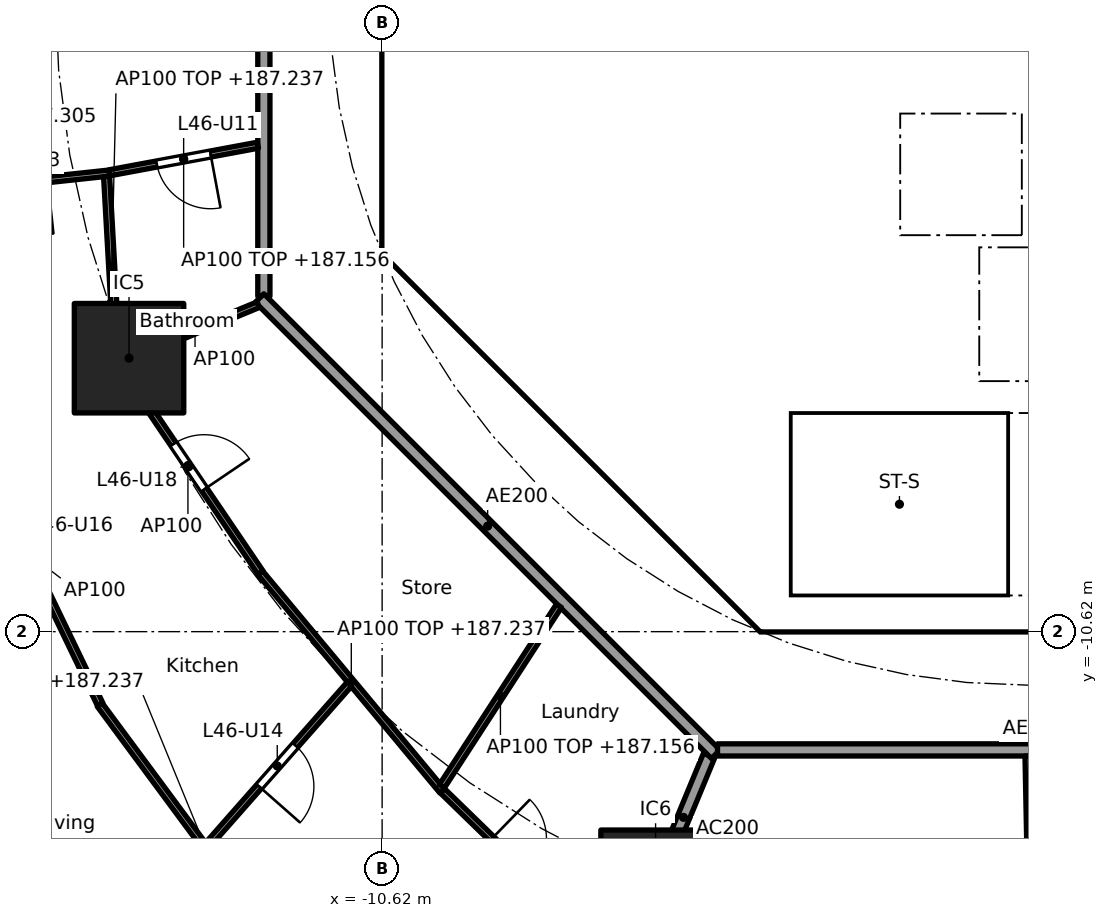
"""IFC4 building model, lengths in metres.
Left out: names, types, materials, properties, quantities, classifications, styles, units other than length and angle.
Written with IfcOpenShell. Run it as: python <this file> out.ifc"""

import sys

from ifc_helpers import new_model, si_unit, direction, frame, frame_2d, origin, origin_2d, place, context, subcontext, project, spatial, polyline, rectangle, outline, extrude, element, fill, save


model = new_model("IFC4")
c1 = context("Model", 3, precision=1e-05, world=origin(), true_north=direction((0.0, 1.0)))
c2 = subcontext(c1, "Body", "Model", "MODEL_VIEW")
j1 = project(units=[si_unit("LENGTHUNIT", "METRE"), si_unit("PLANEANGLEUNIT", "RADIAN")], contexts=[c1])
p1 = place(None, origin())
s1 = spatial("IfcSite", under=j1, at=p1, CompositionType="ELEMENT")
p2 = place(p1, origin())
s2 = spatial("IfcBuilding", under=s1, at=p2, CompositionType="ELEMENT")
p3 = place(p2, frame((0.0, 0.0, 184.4)))
s3 = spatial("IfcBuildingStorey", under=s2, at=p3, CompositionType="ELEMENT", Elevation=184.4)
for number, where, z_axis, x_axis in (
    (1, (-14.782, -6.123, 0.0), (0.0, 0.0, 1.0), (1.0, 0.0, 0.0)),
    (2, (-6.123, -14.782, 0.0), (0.0, 0.0, 1.0), (1.0, 0.0, 0.0)),
):
    element("IfcColumn", number, at=place(p3, frame(where, z_axis=z_axis, x_axis=x_axis)), inside=s3, PredefinedType="COLUMN", context=c2, shape_type="SweptSolid", body=[
        extrude(rectangle(XDim=1.8, YDim=1.8, at=origin_2d()), origin(), (0.0, 0.0, 1.0), 3.7),
    ])
p4 = place(p3, frame((-10.325, 3.801, 0.0), z_axis=(0.0, 0.0, 1.0), x_axis=(0.0, -1.0, 0.0)))
e3 = element("IfcWall", 3, at=p4, inside=s3, PredefinedType="SHEAR", context=c2, shape_type="SweptSolid", body=[
    extrude(rectangle(XDim=7.602, YDim=0.6, at=frame_2d((3.801, 0.0))), origin(), (0.0, 0.0, 1.0), 3.44),
])
p5 = place(p4, frame((0.651, 0.0, 0.0)))
e4 = element("IfcOpeningElement", 4, at=p5, cuts=e3, PredefinedType="OPENING", context=c2, shape_type="SweptSolid", body=[
    extrude(rectangle(XDim=1.5, YDim=2.1, at=frame_2d((0.75, 1.05))), frame((0.0, 0.31, 0.0), z_axis=(0.0, -1.0, 0.0), x_axis=(1.0, 0.0, 0.0)), (0.0, 0.0, 1.0), 0.62),
])
p6 = place(p4, frame((5.451, 0.0, 0.0)))
e5 = element("IfcOpeningElement", 5, at=p6, cuts=e3, PredefinedType="OPENING", context=c2, shape_type="SweptSolid", body=[
    extrude(rectangle(XDim=1.5, YDim=2.1, at=frame_2d((0.75, 1.05))), frame((0.0, 0.31, 0.0), z_axis=(0.0, -1.0, 0.0), x_axis=(1.0, 0.0, 0.0)), (0.0, 0.0, 1.0), 0.62),
])
p7 = place(p3, frame((-9.988, -4.613, 0.0), z_axis=(0.0, 0.0, 1.0), x_axis=(0.707106781187, -0.707106781187, 0.0)))
e6 = element("IfcWall", 6, at=p7, inside=s3, PredefinedType="SHEAR", context=c2, shape_type="SweptSolid", body=[
    extrude(rectangle(XDim=7.602, YDim=0.6, at=frame_2d((3.801, 0.0))), origin(), (0.0, 0.0, 1.0), 3.44),
])
p8 = place(p7, frame((6.151, 0.0, 0.0)))
e7 = element("IfcOpeningElement", 7, at=p8, cuts=e6, PredefinedType="OPENING", context=c2, shape_type="SweptSolid", body=[
    extrude(rectangle(XDim=1.1, YDim=2.1, at=frame_2d((0.55, 1.05))), frame((0.0, 0.31, 0.0), z_axis=(0.0, -1.0, 0.0), x_axis=(1.0, 0.0, 0.0)), (0.0, 0.0, 1.0), 0.62),
])
p9 = place(p3, frame((-7.4, -6.627, 0.0), z_axis=(0.0, 0.0, 1.0), x_axis=(0.0, 1.0, 0.0)))
e8 = element("IfcWall", 8, at=p9, inside=s3, PredefinedType="PARTITIONING", context=c2, shape_type="SweptSolid", body=[
    extrude(rectangle(XDim=2.527, YDim=0.15, at=frame_2d((1.263, 0.0))), origin(), (0.0, 0.0, 1.0), 3.44),
])
p10 = place(p9, frame((0.776, 0.0, 0.0)))
e9 = element("IfcOpeningElement", 9, at=p10, cuts=e8, PredefinedType="OPENING", context=c2, shape_type="SweptSolid", body=[
    extrude(rectangle(XDim=0.9, YDim=2.1, at=frame_2d((0.45, 1.05))), frame((0.0, 0.085, 0.0), z_axis=(0.0, -1.0, 0.0), x_axis=(1.0, 0.0, 0.0)), (0.0, 0.0, 1.0), 0.17),
])
p11 = place(p3, frame((-4.0, -6.5, 0.0), z_axis=(0.0, 0.0, 1.0), x_axis=(0.0, 1.0, 0.0)))
e10 = element("IfcWall", 10, at=p11, inside=s3, PredefinedType="SOLIDWALL", context=c2, shape_type="SweptSolid", body=[
    extrude(rectangle(XDim=2.2, YDim=0.2, at=frame_2d((1.1, 0.0))), origin(), (0.0, 0.0, 1.0), 3.44),
])
p12 = place(p11, frame((0.65, 0.0, 0.0)))
e11 = element("IfcOpeningElement", 11, at=p12, cuts=e10, PredefinedType="OPENING", context=c2, shape_type="SweptSolid", body=[
    extrude(rectangle(XDim=0.9, YDim=2.1, at=frame_2d((0.45, 1.05))), frame((0.0, 0.11, 0.0), z_axis=(0.0, -1.0, 0.0), x_axis=(1.0, 0.0, 0.0)), (0.0, 0.0, 1.0), 0.22),
])
p13 = place(p3, frame((-6.7, -2.0, 0.0), z_axis=(0.0, 0.0, 1.0), x_axis=(1.0, 0.0, 0.0)))
e12 = element("IfcWall", 12, at=p13, inside=s3, PredefinedType="SOLIDWALL", context=c2, shape_type="SweptSolid", body=[
    extrude(rectangle(XDim=13.4, YDim=0.2, at=frame_2d((6.7, 0.0))), origin(), (0.0, 0.0, 1.0), 3.44),
])
p14 = place(p13, frame((5.05, 0.0, 0.0)))
e13 = element("IfcOpeningElement", 13, at=p14, cuts=e12, PredefinedType="OPENING", context=c2, shape_type="SweptSolid", body=[
    extrude(rectangle(XDim=1.1, YDim=2.1, at=frame_2d((0.55, 1.05))), frame((0.0, 0.11, 0.0), z_axis=(0.0, -1.0, 0.0), x_axis=(1.0, 0.0, 0.0)), (0.0, 0.0, 1.0), 0.22),
])
p15 = place(p13, frame((7.25, 0.0, 0.0)))
e14 = element("IfcOpeningElement", 14, at=p15, cuts=e12, PredefinedType="OPENING", context=c2, shape_type="SweptSolid", body=[
    extrude(rectangle(XDim=1.1, YDim=2.1, at=frame_2d((0.55, 1.05))), frame((0.0, 0.11, 0.0), z_axis=(0.0, -1.0, 0.0), x_axis=(1.0, 0.0, 0.0)), (0.0, 0.0, 1.0), 0.22),
])
p16 = place(p13, frame((1.85, 0.0, 0.0)))
e15 = element("IfcOpeningElement", 15, at=p16, cuts=e12, PredefinedType="OPENING", context=c2, shape_type="SweptSolid", body=[
    extrude(rectangle(XDim=0.9, YDim=2.1, at=frame_2d((0.45, 1.05))), frame((0.0, 0.11, 0.0), z_axis=(0.0, -1.0, 0.0), x_axis=(1.0, 0.0, 0.0)), (0.0, 0.0, 1.0), 0.22),
])
p17 = place(p3, origin())
e16 = element("IfcWall", 16, at=p17, inside=s3, PredefinedType="SHEAR", context=c2, shape_type="SweptSolid", body=[
    extrude(outline(polyline([(-10.625, -3.801), (-10.025, -3.801), (-10.025, -4.152), (-9.776, -4.401), (-10.2, -4.825), (-10.625, -4.401), (-10.625, -3.801)])), origin(), (0.0, 0.0, 1.0), 3.44),
])
p18 = place(p3, origin())
e17 = element("IfcWall", 17, at=p18, inside=s3, PredefinedType="SHEAR", context=c2, shape_type="SweptSolid", body=[
    extrude(outline(polyline([(-4.152, -10.025), (4.152, -10.025), (4.401, -9.776), (4.825, -10.2), (4.401, -10.625), (-4.401, -10.625), (-4.825, -10.2), (-4.401, -9.776), (-4.152, -10.025)])), origin(), (0.0, 0.0, 1.0), 3.44),
])
p19 = place(p3, frame((-10.025, -4.0, 0.0), z_axis=(0.0, 0.0, 1.0), x_axis=(1.0, 0.0, 0.0)))
e18 = element("IfcWall", 18, at=p19, inside=s3, PredefinedType="PARTITIONING", context=c2, shape_type="SweptSolid", body=[
    extrude(rectangle(XDim=3.325, YDim=0.2, at=frame_2d((1.662, 0.0))), origin(), (0.0, 0.0, 1.0), 3.44),
])
p20 = place(p3, frame((-0.9, -6.5, 0.0), z_axis=(0.0, 0.0, 1.0), x_axis=(0.0, 1.0, 0.0)))
e19 = element("IfcWall", 19, at=p20, inside=s3, PredefinedType="SOLIDWALL", context=c2, shape_type="SweptSolid", body=[
    extrude(rectangle(XDim=2.2, YDim=0.2, at=frame_2d((1.1, 0.0))), origin(), (0.0, 0.0, 1.0), 3.44),
])
p21 = place(p3, origin())
e20 = element("IfcWall", 20, at=p21, inside=s3, PredefinedType="SOLIDWALL", context=c2, shape_type="SweptSolid", body=[
    extrude(outline(polyline([(-6.7, -2.1), (-6.5, -2.1), (-6.5, -4.1), (-2.3, -4.1), (-2.3, -2.1), (-2.1, -2.1), (-2.1, -4.1), (-0.1, -4.1), (-0.1, -2.1), (0.1, -2.1), (0.1, -4.1), (2.1, -4.1), (2.1, -2.1), (2.3, -2.1), (2.3, -4.1), (4.3, -4.1), (4.3, -2.1), (4.5, -2.1), (4.5, -4.1), (6.5, -4.1), (6.5, -2.1), (6.7, -2.1), (6.7, -4.3), (-6.7, -4.3), (-6.7, -2.1)])), origin(), (0.0, 0.0, 1.0), 3.44),
])
p22 = place(p3, origin())
e21 = element("IfcWall", 21, at=p22, inside=s3, PredefinedType="SOLIDWALL", context=c2, shape_type="SweptSolid", body=[
    extrude(outline(polyline([(-3.9, -10.025), (-4.1, -10.025), (-4.1, -7.025), (-3.9, -7.025), (-3.9, -10.025)])), origin(), (0.0, 0.0, 1.0), 3.44),
])
p23 = place(p3, origin())
e22 = element("IfcWall", 22, at=p23, inside=s3, PredefinedType="SOLIDWALL", context=c2, shape_type="SweptSolid", body=[
    extrude(outline(polyline([(4.1, -7.025), (-4.1, -7.025), (-4.1, -6.5), (4.1, -6.5), (4.1, -7.025)])), origin(), (0.0, 0.0, 1.0), 3.44),
])
p24 = place(p3, frame((-5.243, -12.657, 0.0), z_axis=(0.0, 0.0, 1.0), x_axis=(-0.382707856524, -0.923869415315, 0.0)))
e23 = element("IfcWall", 23, at=p24, inside=s3, PredefinedType="PARTITIONING", context=c2, shape_type="SweptSolid", body=[
    extrude(rectangle(XDim=2.2, YDim=0.2, at=frame_2d((1.1, 0.0))), origin(), (0.0, 0.0, 1.0), 3.44),
])
p25 = place(p3, frame((-12.565, 5.304, 0.0), z_axis=(0.0, 0.0, 1.0), x_axis=(0.0, -1.0, 0.0)))
e24 = element("IfcWall", 24, at=p25, inside=s3, PredefinedType="PARTITIONING", context=c2, shape_type="SweptSolid", body=[
    extrude(rectangle(XDim=10.409, YDim=0.2, at=frame_2d((5.205, 0.0))), origin(), (0.0, 0.0, 1.0), 3.44),
])
p26 = place(p25, frame((4.804, 0.0, 0.0)))
e25 = element("IfcOpeningElement", 25, at=p26, cuts=e24, PredefinedType="OPENING", context=c2, shape_type="SweptSolid", body=[
    extrude(rectangle(XDim=1.0, YDim=2.1, at=frame_2d((0.5, 1.05))), frame((0.0, 0.11, 0.0), z_axis=(0.0, -1.0, 0.0), x_axis=(1.0, 0.0, 0.0)), (0.0, 0.0, 1.0), 0.22),
])
p27 = place(p3, frame((-12.635, -5.134, 0.0), z_axis=(0.0, 0.0, 1.0), x_axis=(0.707106781187, -0.707106781187, 0.0)))
e26 = element("IfcWall", 26, at=p27, inside=s3, PredefinedType="PARTITIONING", context=c2, shape_type="SweptSolid", body=[
    extrude(rectangle(XDim=10.609, YDim=0.2, at=frame_2d((5.305, 0.0))), origin(), (0.0, 0.0, 1.0), 3.44),
])
p28 = place(p3, frame((-5.104, -12.565, 0.0), z_axis=(0.0, 0.0, 1.0), x_axis=(1.0, 0.0, 0.0)))
e27 = element("IfcWall", 27, at=p28, inside=s3, PredefinedType="PARTITIONING", context=c2, shape_type="SweptSolid", body=[
    extrude(rectangle(XDim=10.409, YDim=0.2, at=frame_2d((5.205, 0.0))), origin(), (0.0, 0.0, 1.0), 3.44),
])
p29 = place(p28, frame((6.339, 0.0, 0.0)))
e28 = element("IfcOpeningElement", 28, at=p29, cuts=e27, PredefinedType="OPENING", context=c2, shape_type="SweptSolid", body=[
    extrude(rectangle(XDim=1.0, YDim=2.1, at=frame_2d((0.5, 1.05))), frame((0.0, 0.11, 0.0), z_axis=(0.0, -1.0, 0.0), x_axis=(1.0, 0.0, 0.0)), (0.0, 0.0, 1.0), 0.22),
])
p30 = place(p3, frame((-12.663, -2.621, 0.0), z_axis=(0.0, 0.0, 1.0), x_axis=(-0.983176884312, -0.182655999505, 0.0)))
e29 = element("IfcWall", 29, at=p30, inside=s3, PredefinedType="PARTITIONING", context=c2, shape_type="SweptSolid", body=[
    extrude(rectangle(XDim=2.483, YDim=0.1, at=frame_2d((1.242, 0.0))), origin(), (0.0, 0.0, 1.0), 2.756),
])
p31 = place(p30, frame((0.792, 0.0, 0.0)))
e30 = element("IfcOpeningElement", 30, at=p31, cuts=e29, PredefinedType="OPENING", context=c2, shape_type="SweptSolid", body=[
    extrude(rectangle(XDim=0.9, YDim=2.1, at=frame_2d((0.45, 1.05))), frame((0.0, 0.06, 0.0), z_axis=(0.0, -1.0, 0.0), x_axis=(1.0, 0.0, 0.0)), (0.0, 0.0, 1.0), 0.12),
])
p32 = place(p3, frame((-15.104, -3.078, 0.0), z_axis=(0.0, 0.0, 1.0), x_axis=(-0.994316167803, -0.106467640365, 0.0)))
e31 = element("IfcWall", 31, at=p32, inside=s3, PredefinedType="PARTITIONING", context=c2, shape_type="SweptSolid", body=[
    extrude(rectangle(XDim=6.45, YDim=0.1, at=frame_2d((3.225, 0.0))), origin(), (0.0, 0.0, 1.0), 2.905),
])
p33 = place(p32, frame((1.022, 0.0, 0.0)))
e32 = element("IfcOpeningElement", 32, at=p33, cuts=e31, PredefinedType="OPENING", context=c2, shape_type="SweptSolid", body=[
    extrude(rectangle(XDim=0.9, YDim=2.1, at=frame_2d((0.45, 1.05))), frame((0.0, 0.06, 0.0), z_axis=(0.0, -1.0, 0.0), x_axis=(1.0, 0.0, 0.0)), (0.0, 0.0, 1.0), 0.12),
])
p34 = place(p3, frame((-15.151, -3.133, 0.0), z_axis=(0.0, 0.0, 1.0), x_axis=(0.05637501378, -0.998409664327, 0.0)))
e33 = element("IfcWall", 33, at=p34, inside=s3, PredefinedType="PARTITIONING", context=c2, shape_type="SweptSolid", body=[
    extrude(rectangle(XDim=2.988, YDim=0.1, at=frame_2d((1.494, 0.0))), origin(), (0.0, 0.0, 1.0), 2.837),
])
p35 = place(p3, frame((-12.657, -5.243, 0.0), z_axis=(0.0, 0.0, 1.0), x_axis=(-0.923864733477, -0.382719158442, 0.0)))
e34 = element("IfcWall", 34, at=p35, inside=s3, PredefinedType="PARTITIONING", context=c2, shape_type="SweptSolid", body=[
    extrude(rectangle(XDim=2.25, YDim=0.1, at=frame_2d((1.125, 0.0))), origin(), (0.0, 0.0, 1.0), 3.44),
])
p36 = place(p3, frame((-15.008, -6.125, 0.0), z_axis=(0.0, 0.0, 1.0), x_axis=(0.561073758086, -0.827765811076, 0.0)))
e35 = element("IfcWall", 35, at=p36, inside=s3, PredefinedType="PARTITIONING", context=c2, shape_type="SweptSolid", body=[
    extrude(rectangle(XDim=4.259, YDim=0.1, at=frame_2d((2.129, 0.0))), origin(), (0.0, 0.0, 1.0), 3.44),
])
p37 = place(p36, frame((1.704, 0.0, 0.0)))
e36 = element("IfcOpeningElement", 36, at=p37, cuts=e35, PredefinedType="OPENING", context=c2, shape_type="SweptSolid", body=[
    extrude(rectangle(XDim=0.9, YDim=2.1, at=frame_2d((0.45, 1.05))), frame((0.0, 0.06, 0.0), z_axis=(0.0, -1.0, 0.0), x_axis=(1.0, 0.0, 0.0)), (0.0, 0.0, 1.0), 0.12),
])
p38 = place(p3, frame((-17.669, -6.809, 0.0), z_axis=(0.0, 0.0, 1.0), x_axis=(0.434040130629, -0.900893536997, 0.0)))
e37 = element("IfcWall", 37, at=p38, inside=s3, PredefinedType="PARTITIONING", context=c2, shape_type="SweptSolid", body=[
    extrude(rectangle(XDim=5.558, YDim=0.1, at=frame_2d((2.779, 0.0))), origin(), (0.0, 0.0, 1.0), 3.44),
])
p39 = place(p38, frame((2.329, 0.0, 0.0)))
e38 = element("IfcOpeningElement", 38, at=p39, cuts=e37, PredefinedType="OPENING", context=c2, shape_type="SweptSolid", body=[
    extrude(rectangle(XDim=0.9, YDim=2.1, at=frame_2d((0.45, 1.05))), frame((0.0, 0.06, 0.0), z_axis=(0.0, -1.0, 0.0), x_axis=(1.0, 0.0, 0.0)), (0.0, 0.0, 1.0), 0.12),
])
p40 = place(p3, frame((-12.623, -9.653, 0.0), z_axis=(0.0, 0.0, 1.0), x_axis=(0.640297481347, -0.768127030758, 0.0)))
e39 = element("IfcWall", 39, at=p40, inside=s3, PredefinedType="PARTITIONING", context=c2, shape_type="SweptSolid", body=[
    extrude(rectangle(XDim=4.672, YDim=0.1, at=frame_2d((2.336, 0.0))), origin(), (0.0, 0.0, 1.0), 2.837),
])
p41 = place(p3, frame((-15.265, -11.821, 0.0), z_axis=(0.0, 0.0, 1.0), x_axis=(0.594711348772, -0.803939308432, 0.0)))
e40 = element("IfcWall", 40, at=p41, inside=s3, PredefinedType="PARTITIONING", context=c2, shape_type="SweptSolid", body=[
    extrude(rectangle(XDim=5.872, YDim=0.1, at=frame_2d((2.936, 0.0))), origin(), (0.0, 0.0, 1.0), 2.837),
])
p42 = place(p3, frame((-11.16, -11.485, 0.0), z_axis=(0.0, 0.0, 1.0), x_axis=(-0.661275898802, -0.750142776852, 0.0)))
e41 = element("IfcWall", 41, at=p42, inside=s3, PredefinedType="PARTITIONING", context=c2, shape_type="SweptSolid", body=[
    extrude(rectangle(XDim=8.083, YDim=0.1, at=frame_2d((4.041, 0.0))), origin(), (0.0, 0.0, 1.0), 2.905),
])
p43 = place(p42, frame((1.341, 0.0, 0.0)))
e42 = element("IfcOpeningElement", 42, at=p43, cuts=e41, PredefinedType="OPENING", context=c2, shape_type="SweptSolid", body=[
    extrude(rectangle(XDim=0.9, YDim=2.1, at=frame_2d((0.45, 1.05))), frame((0.0, 0.06, 0.0), z_axis=(0.0, -1.0, 0.0), x_axis=(1.0, 0.0, 0.0)), (0.0, 0.0, 1.0), 0.12),
])
p44 = place(p42, frame((5.382, 0.0, 0.0)))
e43 = element("IfcOpeningElement", 43, at=p44, cuts=e41, PredefinedType="OPENING", context=c2, shape_type="SweptSolid", body=[
    extrude(rectangle(XDim=0.9, YDim=2.1, at=frame_2d((0.45, 1.05))), frame((0.0, 0.06, 0.0), z_axis=(0.0, -1.0, 0.0), x_axis=(1.0, 0.0, 0.0)), (0.0, 0.0, 1.0), 0.12),
])
p45 = place(p3, frame((-7.712, -10.195, 0.0), z_axis=(0.0, 0.0, 1.0), x_axis=(-0.544170086001, -0.838974920663, 0.0)))
e44 = element("IfcWall", 44, at=p45, inside=s3, PredefinedType="PARTITIONING", context=c2, shape_type="SweptSolid", body=[
    extrude(rectangle(XDim=3.535, YDim=0.1, at=frame_2d((1.768, 0.0))), origin(), (0.0, 0.0, 1.0), 2.756),
])
p46 = place(p3, frame((-9.627, -13.238, 0.0), z_axis=(0.0, 0.0, 1.0), x_axis=(0.716919058692, -0.697156412352, 0.0)))
e45 = element("IfcWall", 45, at=p46, inside=s3, PredefinedType="PARTITIONING", context=c2, shape_type="SweptSolid", body=[
    extrude(rectangle(XDim=4.2, YDim=0.1, at=frame_2d((2.1, 0.0))), origin(), (0.0, 0.0, 1.0), 2.837),
])
p47 = place(p46, frame((1.13, 0.0, 0.0)))
e46 = element("IfcOpeningElement", 46, at=p47, cuts=e45, PredefinedType="OPENING", context=c2, shape_type="SweptSolid", body=[
    extrude(rectangle(XDim=0.9, YDim=2.1, at=frame_2d((0.45, 1.05))), frame((0.0, 0.06, 0.0), z_axis=(0.0, -1.0, 0.0), x_axis=(1.0, 0.0, 0.0)), (0.0, 0.0, 1.0), 0.12),
])
p48 = place(p3, frame((0.002, -12.665, 0.0), z_axis=(0.0, 0.0, 1.0), x_axis=(0.019992969345, -0.999800120613, 0.0)))
e47 = element("IfcWall", 47, at=p48, inside=s3, PredefinedType="PARTITIONING", context=c2, shape_type="SweptSolid", body=[
    extrude(rectangle(XDim=9.659, YDim=0.1, at=frame_2d((4.83, 0.0))), origin(), (0.0, 0.0, 1.0), 2.756),
])
p49 = place(p48, frame((1.873, 0.0, 0.0)))
e48 = element("IfcOpeningElement", 48, at=p49, cuts=e47, PredefinedType="OPENING", context=c2, shape_type="SweptSolid", body=[
    extrude(rectangle(XDim=0.9, YDim=2.1, at=frame_2d((0.45, 1.05))), frame((0.0, 0.06, 0.0), z_axis=(0.0, -1.0, 0.0), x_axis=(1.0, 0.0, 0.0)), (0.0, 0.0, 1.0), 0.12),
])
p50 = place(p48, frame((6.703, 0.0, 0.0)))
e49 = element("IfcOpeningElement", 49, at=p50, cuts=e47, PredefinedType="OPENING", context=c2, shape_type="SweptSolid", body=[
    extrude(rectangle(XDim=0.9, YDim=2.1, at=frame_2d((0.45, 1.05))), frame((0.0, 0.06, 0.0), z_axis=(0.0, -1.0, 0.0), x_axis=(1.0, 0.0, 0.0)), (0.0, 0.0, 1.0), 0.12),
])
p51 = place(p14, origin())
e50 = element("IfcDoor", 50, at=p51, inside=s3, OperationType="DOUBLE_DOOR_SLIDING", PredefinedType="DOOR", context=c2, shape_type="SweptSolid", body=[
    extrude(rectangle(XDim=1.1, YDim=2.1, at=frame_2d((0.55, 1.05))), frame((0.0, 0.025, 0.0), z_axis=(0.0, -1.0, 0.0), x_axis=(1.0, 0.0, 0.0)), (0.0, 0.0, 1.0), 0.05),
])
fill(e13, e50)
p52 = place(p10, origin())
e51 = element("IfcDoor", 51, at=p52, inside=s3, OperationType="SINGLE_SWING_RIGHT", PredefinedType="DOOR", context=c2, shape_type="SweptSolid", body=[
    extrude(rectangle(XDim=0.9, YDim=2.1, at=frame_2d((0.45, 1.05))), frame((0.0, 0.025, 0.0), z_axis=(0.0, -1.0, 0.0), x_axis=(1.0, 0.0, 0.0)), (0.0, 0.0, 1.0), 0.05),
])
fill(e9, e51)
p53 = place(p12, frame((0.9, 0.0, 0.0), x_axis=(-1.0, 0.0, 0.0)))
e52 = element("IfcDoor", 52, at=p53, inside=s3, OperationType="SINGLE_SWING_RIGHT", PredefinedType="DOOR", context=c2, shape_type="SweptSolid", body=[
    extrude(rectangle(XDim=0.9, YDim=2.1, at=frame_2d((0.45, 1.05))), frame((0.0, 0.025, 0.0), z_axis=(0.0, -1.0, 0.0), x_axis=(1.0, 0.0, 0.0)), (0.0, 0.0, 1.0), 0.05),
])
fill(e11, e52)
p54 = place(p16, frame((0.9, 0.0, 0.0), x_axis=(-1.0, 0.0, 0.0)))
e53 = element("IfcDoor", 53, at=p54, inside=s3, OperationType="SINGLE_SWING_RIGHT", PredefinedType="DOOR", context=c2, shape_type="SweptSolid", body=[
    extrude(rectangle(XDim=0.9, YDim=2.1, at=frame_2d((0.45, 1.05))), frame((0.0, 0.025, 0.0), z_axis=(0.0, -1.0, 0.0), x_axis=(1.0, 0.0, 0.0)), (0.0, 0.0, 1.0), 0.05),
])
fill(e15, e53)
p55 = place(p6, origin())
e54 = element("IfcDoor", 54, at=p55, inside=s3, OperationType="DOUBLE_DOOR_SINGLE_SWING", PredefinedType="DOOR", context=c2, shape_type="SweptSolid", body=[
    extrude(rectangle(XDim=1.5, YDim=2.1, at=frame_2d((0.75, 1.05))), frame((0.0, 0.025, 0.0), z_axis=(0.0, -1.0, 0.0), x_axis=(1.0, 0.0, 0.0)), (0.0, 0.0, 1.0), 0.05),
])
fill(e5, e54)
p56 = place(p8, origin())
e55 = element("IfcDoor", 55, at=p56, inside=s3, OperationType="SINGLE_SWING_RIGHT", PredefinedType="DOOR", context=c2, shape_type="SweptSolid", body=[
    extrude(rectangle(XDim=1.1, YDim=2.1, at=frame_2d((0.55, 1.05))), frame((0.0, 0.025, 0.0), z_axis=(0.0, -1.0, 0.0), x_axis=(1.0, 0.0, 0.0)), (0.0, 0.0, 1.0), 0.05),
])
fill(e7, e55)
p57 = place(p31, origin())
e56 = element("IfcDoor", 56, at=p57, inside=s3, OperationType="SINGLE_SWING_LEFT", PredefinedType="DOOR", context=c2, shape_type="SweptSolid", body=[
    extrude(rectangle(XDim=0.9, YDim=2.1, at=frame_2d((0.45, 1.05))), frame((0.0, 0.025, 0.0), z_axis=(0.0, -1.0, 0.0), x_axis=(1.0, 0.0, 0.0)), (0.0, 0.0, 1.0), 0.05),
])
fill(e30, e56)
p58 = place(p43, origin())
e57 = element("IfcDoor", 57, at=p58, inside=s3, OperationType="SINGLE_SWING_RIGHT", PredefinedType="DOOR", context=c2, shape_type="SweptSolid", body=[
    extrude(rectangle(XDim=0.9, YDim=2.1, at=frame_2d((0.45, 1.05))), frame((0.0, 0.025, 0.0), z_axis=(0.0, -1.0, 0.0), x_axis=(1.0, 0.0, 0.0)), (0.0, 0.0, 1.0), 0.05),
])
fill(e42, e57)
p59 = place(p37, origin())
e58 = element("IfcDoor", 58, at=p59, inside=s3, OperationType="SINGLE_SWING_RIGHT", PredefinedType="DOOR", context=c2, shape_type="SweptSolid", body=[
    extrude(rectangle(XDim=0.9, YDim=2.1, at=frame_2d((0.45, 1.05))), frame((0.0, 0.025, 0.0), z_axis=(0.0, -1.0, 0.0), x_axis=(1.0, 0.0, 0.0)), (0.0, 0.0, 1.0), 0.05),
])
fill(e36, e58)
p60 = place(p47, origin())
e59 = element("IfcDoor", 59, at=p60, inside=s3, OperationType="SINGLE_SWING_LEFT", PredefinedType="DOOR", context=c2, shape_type="SweptSolid", body=[
    extrude(rectangle(XDim=0.9, YDim=2.1, at=frame_2d((0.45, 1.05))), frame((0.0, 0.025, 0.0), z_axis=(0.0, -1.0, 0.0), x_axis=(1.0, 0.0, 0.0)), (0.0, 0.0, 1.0), 0.05),
])
fill(e46, e59)
save(model, sys.argv[1])
